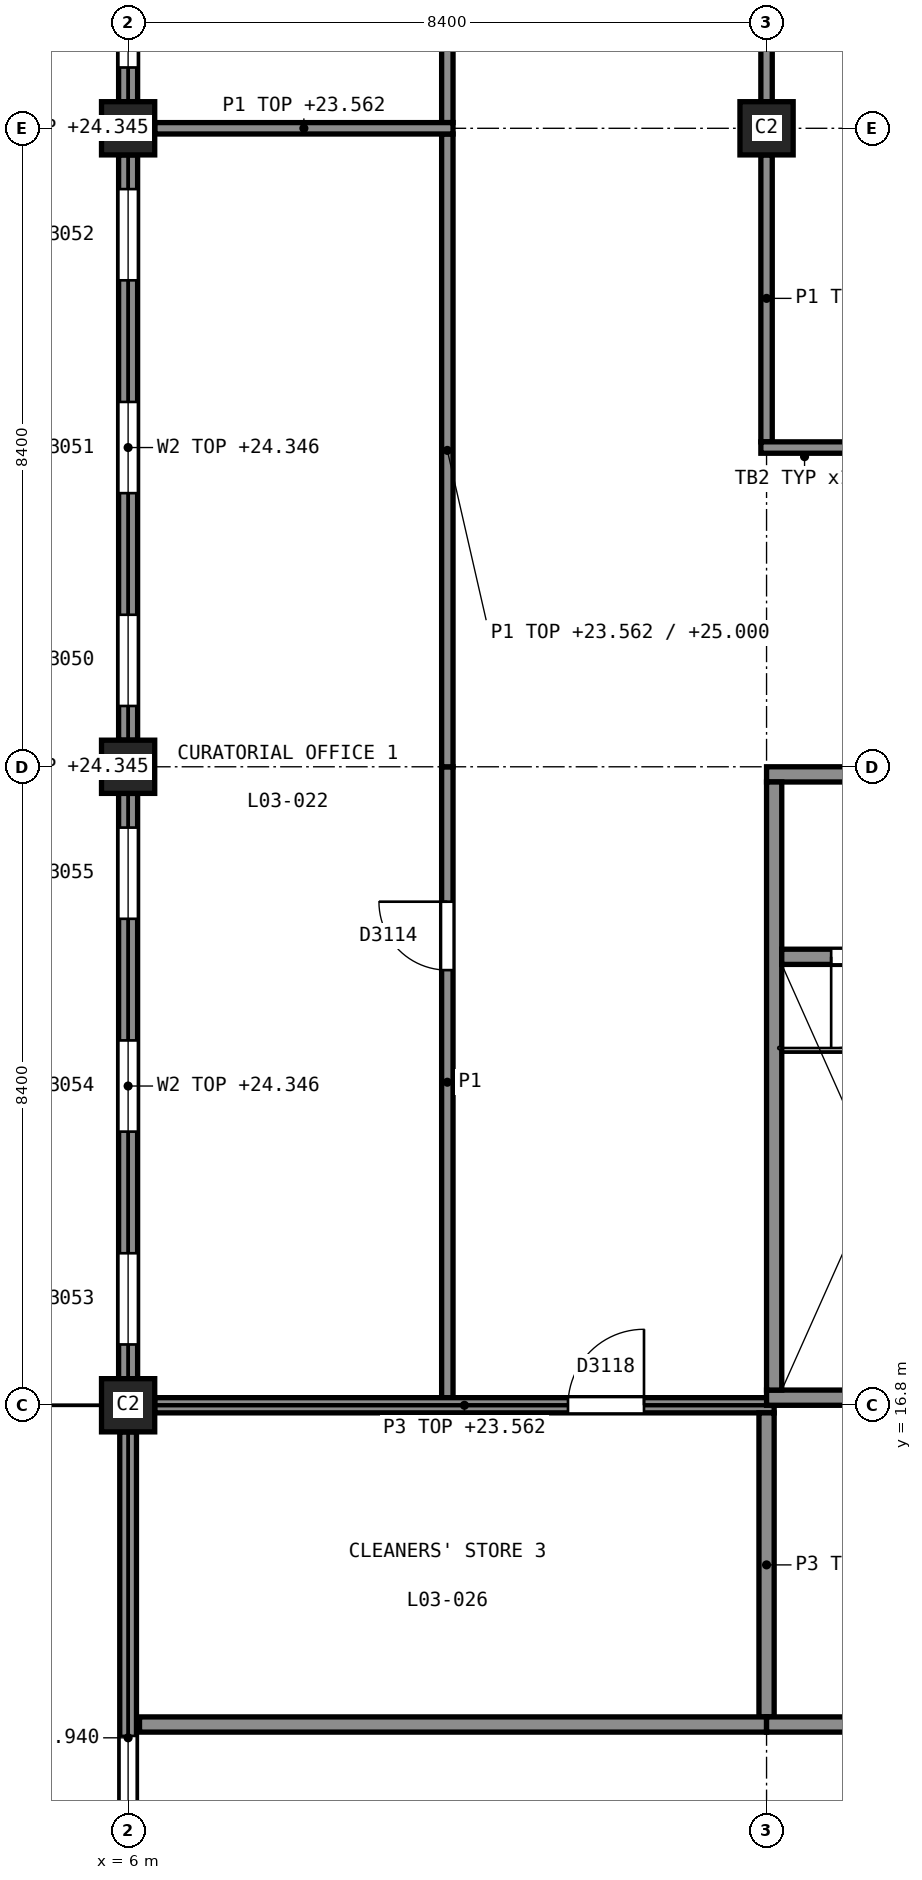
"""IFC4 building model, lengths in metres.
Left out: names, types, materials, properties, quantities, classifications, styles, units other than length and angle.
Written with IfcOpenShell. Run it as: python <this file> out.ifc"""

import sys

from ifc_helpers import new_model, si_unit, direction, frame, frame_2d, origin, origin_2d, place, context, subcontext, project, spatial, polyline, rectangle, outline, extrude, element, fill, save


model = new_model("IFC4")
c1 = context("Model", 3, precision=1e-05, world=origin(), true_north=direction((0.0, 1.0)))
c2 = subcontext(c1, "Body", "Model", "MODEL_VIEW")
j1 = project(units=[si_unit("LENGTHUNIT", "METRE"), si_unit("PLANEANGLEUNIT", "RADIAN")], contexts=[c1])
p1 = place(None, origin())
s1 = spatial("IfcSite", under=j1, at=p1, CompositionType="ELEMENT")
p2 = place(p1, origin())
s2 = spatial("IfcBuilding", under=s1, at=p2, CompositionType="ELEMENT")
p3 = place(p2, frame((0.0, 0.0, 20.0)))
s3 = spatial("IfcBuildingStorey", under=s2, at=p3, CompositionType="ELEMENT", Elevation=20.0)
p4 = place(p3, frame((14.4, 16.9, 0.0), z_axis=(0.0, 0.0, 1.0), x_axis=(1.0, 0.0, 0.0)))
e1 = element("IfcWall", 1, at=p4, inside=s3, PredefinedType="SHEAR", context=c2, shape_type="SweptSolid", body=[
    extrude(rectangle(XDim=8.4, YDim=0.2, at=frame_2d((4.2, 0.0))), origin(), (0.0, 0.0, 1.0), 8.8),
])
p5 = place(p3, frame((14.4, 25.1, 0.0), z_axis=(0.0, 0.0, 1.0), x_axis=(1.0, 0.0, 0.0)))
e2 = element("IfcWall", 2, at=p5, inside=s3, PredefinedType="SHEAR", context=c2, shape_type="SweptSolid", body=[
    extrude(outline(polyline([(0.0, 0.0), (8.4, 0.0), (8.4, 8.8), (7.531, 8.572), (7.241, 8.497), (5.503, 8.041), (5.214, 7.966), (3.186, 7.434), (2.896, 7.359), (1.159, 6.903), (0.869, 6.828), (0.0, 6.6), (0.0, 0.0)])), frame((0.0, 0.1, 0.0), z_axis=(0.0, -1.0, 0.0), x_axis=(1.0, 0.0, 0.0)), (0.0, 0.0, 1.0), 0.2),
])
p6 = place(p5, frame((3.3, 0.0, 0.0)))
e3 = element("IfcOpeningElement", 3, at=p6, cuts=e2, PredefinedType="OPENING", context=c2, shape_type="SweptSolid", body=[
    extrude(rectangle(XDim=1.8, YDim=2.1, at=frame_2d((0.9, 1.05))), frame((0.0, 0.11, 0.0), z_axis=(0.0, -1.0, 0.0), x_axis=(1.0, 0.0, 0.0)), (0.0, 0.0, 1.0), 0.22),
])
p7 = place(p3, frame((14.5, 17.0, 0.0), z_axis=(0.0, 0.0, 1.0), x_axis=(0.0, 1.0, 0.0)))
e4 = element("IfcWall", 4, at=p7, inside=s3, PredefinedType="SHEAR", context=c2, shape_type="SweptSolid", body=[
    extrude(rectangle(XDim=8.0, YDim=0.2, at=frame_2d((4.0, 0.0))), origin(), (0.0, 0.0, 1.0), 6.625),
])
p8 = place(p3, frame((14.6, 22.7, 0.0), z_axis=(0.0, 0.0, 1.0), x_axis=(1.0, 0.0, 0.0)))
e5 = element("IfcWall", 5, at=p8, inside=s3, PredefinedType="SHEAR", context=c2, shape_type="SweptSolid", body=[
    extrude(outline(polyline([(0.0, 0.0), (8.0, 0.0), (8.0, 8.748), (7.407, 8.592), (7.111, 8.515), (6.815, 8.437), (6.519, 8.36), (5.926, 8.204), (5.63, 8.127), (5.333, 8.049), (5.037, 7.972), (4.444, 7.816), (4.148, 7.739), (3.852, 7.661), (3.556, 7.584), (2.963, 7.428), (2.667, 7.351), (2.37, 7.273), (2.074, 7.196), (1.481, 7.04), (1.185, 6.963), (0.889, 6.885), (0.593, 6.808), (0.0, 6.652), (0.0, 0.0)])), frame((0.0, 0.1, 0.0), z_axis=(0.0, -1.0, 0.0), x_axis=(1.0, 0.0, 0.0)), (0.0, 0.0, 1.0), 0.2),
])
p9 = place(p8, frame((0.65, 0.0, 0.0)))
e6 = element("IfcOpeningElement", 6, at=p9, cuts=e5, PredefinedType="OPENING", context=c2, shape_type="SweptSolid", body=[
    extrude(rectangle(XDim=1.2, YDim=2.1, at=frame_2d((0.6, 1.05))), frame((0.0, 0.11, 0.0), z_axis=(0.0, -1.0, 0.0), x_axis=(1.0, 0.0, 0.0)), (0.0, 0.0, 1.0), 0.22),
])
p10 = place(p8, frame((6.15, 0.0, 0.0)))
e7 = element("IfcOpeningElement", 7, at=p10, cuts=e5, PredefinedType="OPENING", context=c2, shape_type="SweptSolid", body=[
    extrude(rectangle(XDim=1.2, YDim=2.1, at=frame_2d((0.6, 1.05))), frame((0.0, 0.11, 0.0), z_axis=(0.0, -1.0, 0.0), x_axis=(1.0, 0.0, 0.0)), (0.0, 0.0, 1.0), 0.22),
])
p11 = place(p8, frame((3.45, 0.0, 0.0)))
e8 = element("IfcOpeningElement", 8, at=p11, cuts=e5, PredefinedType="OPENING", context=c2, shape_type="SweptSolid", body=[
    extrude(rectangle(XDim=1.1, YDim=2.1, at=frame_2d((0.55, 1.05))), frame((0.0, 0.11, 0.0), z_axis=(0.0, -1.0, 0.0), x_axis=(1.0, 0.0, 0.0)), (0.0, 0.0, 1.0), 0.22),
])
p12 = place(p3, frame((6.0, 16.8, 0.0), z_axis=(0.0, 0.0, 1.0), x_axis=(1.0, 0.0, 0.0)))
e9 = element("IfcColumn", 9, at=p12, inside=s3, PredefinedType="COLUMN", context=c2, shape_type="SweptSolid", body=[
    extrude(rectangle(XDim=0.7, YDim=0.7, at=origin_2d()), origin(), (0.0, 0.0, 1.0), 5.0),
])
for number, where, z_axis, x_axis in (
    (10, (6.0, 25.2, 0.0), (0.0, 0.0, 1.0), (1.0, 0.0, 0.0)),
    (11, (6.0, 33.6, 0.0), (0.0, 0.0, 1.0), (1.0, 0.0, 0.0)),
):
    element("IfcColumn", number, at=place(p3, frame(where, z_axis=z_axis, x_axis=x_axis)), inside=s3, PredefinedType="COLUMN", context=c2, shape_type="SweptSolid", body=[
        extrude(rectangle(XDim=0.7, YDim=0.7, at=origin_2d()), origin(), (0.0, 0.0, 1.0), 4.345),
    ])
p13 = place(p3, frame((14.4, 33.6, 0.0), z_axis=(0.0, 0.0, 1.0), x_axis=(1.0, 0.0, 0.0)))
e12 = element("IfcColumn", 12, at=p13, inside=s3, PredefinedType="COLUMN", context=c2, shape_type="SweptSolid", body=[
    extrude(rectangle(XDim=0.7, YDim=0.7, at=origin_2d()), origin(), (0.0, 0.0, 1.0), 5.0),
])
p14 = place(p3, frame((6.0, 33.95, 0.0), z_axis=(0.0, 0.0, 1.0), x_axis=(0.0, 1.0, 0.0)))
e13 = element("IfcWall", 13, at=p14, inside=s3, PredefinedType="SOLIDWALL", context=c2, shape_type="SweptSolid", body=[
    extrude(rectangle(XDim=7.7, YDim=0.25, at=frame_2d((3.85, 0.0))), origin(), (0.0, 0.0, 1.0), 4.346),
])
p15 = place(p14, frame((0.45, 0.0, 0.9)))
e14 = element("IfcOpeningElement", 14, at=p15, cuts=e13, PredefinedType="OPENING", context=c2, shape_type="SweptSolid", body=[
    extrude(rectangle(XDim=1.2, YDim=2.1, at=frame_2d((0.6, 1.05))), frame((0.0, 0.135, 0.0), z_axis=(0.0, -1.0, 0.0), x_axis=(1.0, 0.0, 0.0)), (0.0, 0.0, 1.0), 0.27),
])
p16 = place(p14, frame((3.25, 0.0, 0.9)))
e15 = element("IfcOpeningElement", 15, at=p16, cuts=e13, PredefinedType="OPENING", context=c2, shape_type="SweptSolid", body=[
    extrude(rectangle(XDim=1.2, YDim=2.1, at=frame_2d((0.6, 1.05))), frame((0.0, 0.135, 0.0), z_axis=(0.0, -1.0, 0.0), x_axis=(1.0, 0.0, 0.0)), (0.0, 0.0, 1.0), 0.27),
])
p17 = place(p14, frame((6.05, 0.0, 0.9)))
e16 = element("IfcOpeningElement", 16, at=p17, cuts=e13, PredefinedType="OPENING", context=c2, shape_type="SweptSolid", body=[
    extrude(rectangle(XDim=1.2, YDim=2.1, at=frame_2d((0.6, 1.05))), frame((0.0, 0.135, 0.0), z_axis=(0.0, -1.0, 0.0), x_axis=(1.0, 0.0, 0.0)), (0.0, 0.0, 1.0), 0.27),
])
p18 = place(p3, frame((6.0, 25.55, 0.0), z_axis=(0.0, 0.0, 1.0), x_axis=(0.0, 1.0, 0.0)))
e17 = element("IfcWall", 17, at=p18, inside=s3, PredefinedType="SOLIDWALL", context=c2, shape_type="SweptSolid", body=[
    extrude(rectangle(XDim=7.7, YDim=0.25, at=frame_2d((3.85, 0.0))), origin(), (0.0, 0.0, 1.0), 4.346),
])
p19 = place(p18, frame((0.45, 0.0, 0.9)))
e18 = element("IfcOpeningElement", 18, at=p19, cuts=e17, PredefinedType="OPENING", context=c2, shape_type="SweptSolid", body=[
    extrude(rectangle(XDim=1.2, YDim=2.1, at=frame_2d((0.6, 1.05))), frame((0.0, 0.135, 0.0), z_axis=(0.0, -1.0, 0.0), x_axis=(1.0, 0.0, 0.0)), (0.0, 0.0, 1.0), 0.27),
])
p20 = place(p18, frame((3.25, 0.0, 0.9)))
e19 = element("IfcOpeningElement", 19, at=p20, cuts=e17, PredefinedType="OPENING", context=c2, shape_type="SweptSolid", body=[
    extrude(rectangle(XDim=1.2, YDim=2.1, at=frame_2d((0.6, 1.05))), frame((0.0, 0.135, 0.0), z_axis=(0.0, -1.0, 0.0), x_axis=(1.0, 0.0, 0.0)), (0.0, 0.0, 1.0), 0.27),
])
p21 = place(p18, frame((6.05, 0.0, 0.9)))
e20 = element("IfcOpeningElement", 20, at=p21, cuts=e17, PredefinedType="OPENING", context=c2, shape_type="SweptSolid", body=[
    extrude(rectangle(XDim=1.2, YDim=2.1, at=frame_2d((0.6, 1.05))), frame((0.0, 0.135, 0.0), z_axis=(0.0, -1.0, 0.0), x_axis=(1.0, 0.0, 0.0)), (0.0, 0.0, 1.0), 0.27),
])
p22 = place(p3, frame((6.0, 17.15, 0.0), z_axis=(0.0, 0.0, 1.0), x_axis=(0.0, 1.0, 0.0)))
e21 = element("IfcWall", 21, at=p22, inside=s3, PredefinedType="SOLIDWALL", context=c2, shape_type="SweptSolid", body=[
    extrude(rectangle(XDim=7.7, YDim=0.25, at=frame_2d((3.85, 0.0))), origin(), (0.0, 0.0, 1.0), 4.346),
])
p23 = place(p22, frame((0.45, 0.0, 0.9)))
e22 = element("IfcOpeningElement", 22, at=p23, cuts=e21, PredefinedType="OPENING", context=c2, shape_type="SweptSolid", body=[
    extrude(rectangle(XDim=1.2, YDim=2.1, at=frame_2d((0.6, 1.05))), frame((0.0, 0.135, 0.0), z_axis=(0.0, -1.0, 0.0), x_axis=(1.0, 0.0, 0.0)), (0.0, 0.0, 1.0), 0.27),
])
p24 = place(p22, frame((3.25, 0.0, 0.9)))
e23 = element("IfcOpeningElement", 23, at=p24, cuts=e21, PredefinedType="OPENING", context=c2, shape_type="SweptSolid", body=[
    extrude(rectangle(XDim=1.2, YDim=2.1, at=frame_2d((0.6, 1.05))), frame((0.0, 0.135, 0.0), z_axis=(0.0, -1.0, 0.0), x_axis=(1.0, 0.0, 0.0)), (0.0, 0.0, 1.0), 0.27),
])
p25 = place(p22, frame((6.05, 0.0, 0.9)))
e24 = element("IfcOpeningElement", 24, at=p25, cuts=e21, PredefinedType="OPENING", context=c2, shape_type="SweptSolid", body=[
    extrude(rectangle(XDim=1.2, YDim=2.1, at=frame_2d((0.6, 1.05))), frame((0.0, 0.135, 0.0), z_axis=(0.0, -1.0, 0.0), x_axis=(1.0, 0.0, 0.0)), (0.0, 0.0, 1.0), 0.27),
])
p26 = place(p3, frame((6.0, 8.4, 0.0), z_axis=(0.0, 0.0, 1.0), x_axis=(0.0, 1.0, 0.0)))
e25 = element("IfcWall", 25, at=p26, inside=s3, PredefinedType="SOLIDWALL", context=c2, shape_type="SweptSolid", body=[
    extrude(rectangle(XDim=8.05, YDim=0.22, at=frame_2d((4.025, 0.0))), origin(), (0.0, 0.0, 1.0), 3.94),
])
p27 = place(p26, frame((0.45, 0.0, 0.9)))
e26 = element("IfcOpeningElement", 26, at=p27, cuts=e25, PredefinedType="OPENING", context=c2, shape_type="SweptSolid", body=[
    extrude(rectangle(XDim=3.6, YDim=1.5, at=frame_2d((1.8, 0.75))), frame((0.0, 0.12, 0.0), z_axis=(0.0, -1.0, 0.0), x_axis=(1.0, 0.0, 0.0)), (0.0, 0.0, 1.0), 0.24),
])
p28 = place(p3, frame((10.2, 33.675, 0.0), z_axis=(0.0, 0.0, 1.0), x_axis=(0.0, 1.0, 0.0)))
e27 = element("IfcWall", 27, at=p28, inside=s3, PredefinedType="PARTITIONING", context=c2, shape_type="SweptSolid", body=[
    extrude(outline(polyline([(0.0, 0.0), (8.325, 0.0), (8.325, 3.562), (7.35, 5.0), (5.25, 5.0), (4.2, 3.562), (3.15, 5.0), (0.0, 5.0), (0.0, 0.0)])), frame((0.0, 0.075, 0.0), z_axis=(0.0, -1.0, 0.0), x_axis=(1.0, 0.0, 0.0)), (0.0, 0.0, 1.0), 0.15),
])
p29 = place(p28, frame((5.65, 0.0, 0.0)))
e28 = element("IfcOpeningElement", 28, at=p29, cuts=e27, PredefinedType="OPENING", context=c2, shape_type="SweptSolid", body=[
    extrude(rectangle(XDim=0.9, YDim=2.1, at=frame_2d((0.45, 1.05))), frame((0.0, 0.085, 0.0), z_axis=(0.0, -1.0, 0.0), x_axis=(1.0, 0.0, 0.0)), (0.0, 0.0, 1.0), 0.17),
])
p30 = place(p3, frame((14.4, 29.475, 0.0), z_axis=(0.0, 0.0, 1.0), x_axis=(0.0, 1.0, 0.0)))
e29 = element("IfcWall", 29, at=p30, inside=s3, PredefinedType="PARTITIONING", context=c2, shape_type="SweptSolid", body=[
    extrude(rectangle(XDim=3.775, YDim=0.15, at=frame_2d((1.887, 0.0))), origin(), (0.0, 0.0, 1.0), 6.1),
])
p31 = place(p3, frame((14.4, 33.95, 0.0), z_axis=(0.0, 0.0, 1.0), x_axis=(0.0, 1.0, 0.0)))
e30 = element("IfcWall", 30, at=p31, inside=s3, PredefinedType="PARTITIONING", context=c2, shape_type="SweptSolid", body=[
    extrude(outline(polyline([(0.0, 0.0), (7.7, 0.0), (7.7, 6.1), (6.3, 6.1), (5.25, 3.562), (4.2, 6.1), (2.1, 6.1), (1.05, 3.562), (0.0, 6.1), (0.0, 0.0)])), frame((0.0, 0.075, 0.0), z_axis=(0.0, -1.0, 0.0), x_axis=(1.0, 0.0, 0.0)), (0.0, 0.0, 1.0), 0.15),
])
p32 = place(p3, frame((14.325, 29.4, 0.0), z_axis=(0.0, 0.0, 1.0), x_axis=(1.0, 0.0, 0.0)))
e31 = element("IfcWall", 31, at=p32, inside=s3, PredefinedType="PARTITIONING", context=c2, shape_type="SweptSolid", body=[
    extrude(outline(polyline([(0.0, 0.0), (8.325, 0.0), (8.325, 8.221), (7.35, 8.005), (1.05, 6.355), (0.0, 3.562), (0.0, 0.0)])), frame((0.0, 0.075, 0.0), z_axis=(0.0, -1.0, 0.0), x_axis=(1.0, 0.0, 0.0)), (0.0, 0.0, 1.0), 0.15),
])
p33 = place(p32, frame((1.438, 0.0, 0.0)))
e32 = element("IfcOpeningElement", 32, at=p33, cuts=e31, PredefinedType="OPENING", context=c2, shape_type="SweptSolid", body=[
    extrude(rectangle(XDim=1.8, YDim=2.1, at=frame_2d((0.9, 1.05))), frame((0.0, 0.085, 0.0), z_axis=(0.0, -1.0, 0.0), x_axis=(1.0, 0.0, 0.0)), (0.0, 0.0, 1.0), 0.17),
])
p34 = place(p3, frame((10.2, 16.9, 0.0), z_axis=(0.0, 0.0, 1.0), x_axis=(0.0, 1.0, 0.0)))
e33 = element("IfcWall", 33, at=p34, inside=s3, PredefinedType="PARTITIONING", context=c2, shape_type="SweptSolid", body=[
    extrude(outline(polyline([(0.0, 0.0), (8.3, 0.0), (8.3, 5.0), (5.25, 5.0), (4.2, 3.562), (3.15, 5.0), (0.0, 5.0), (0.0, 0.0)])), frame((0.0, 0.075, 0.0), z_axis=(0.0, -1.0, 0.0), x_axis=(1.0, 0.0, 0.0)), (0.0, 0.0, 1.0), 0.15),
])
p35 = place(p34, frame((5.625, 0.0, 0.0)))
e34 = element("IfcOpeningElement", 34, at=p35, cuts=e33, PredefinedType="OPENING", context=c2, shape_type="SweptSolid", body=[
    extrude(rectangle(XDim=0.9, YDim=2.1, at=frame_2d((0.45, 1.05))), frame((0.0, 0.085, 0.0), z_axis=(0.0, -1.0, 0.0), x_axis=(1.0, 0.0, 0.0)), (0.0, 0.0, 1.0), 0.17),
])
p36 = place(p3, frame((10.2, 25.2, 0.0), z_axis=(0.0, 0.0, 1.0), x_axis=(0.0, 1.0, 0.0)))
e35 = element("IfcWall", 35, at=p36, inside=s3, PredefinedType="PARTITIONING", context=c2, shape_type="SweptSolid", body=[
    extrude(outline(polyline([(0.0, 0.0), (8.325, 0.0), (8.325, 5.0), (5.25, 5.0), (4.2, 3.562), (3.15, 5.0), (1.05, 5.0), (0.0, 3.562), (0.0, 0.0)])), frame((0.0, 0.075, 0.0), z_axis=(0.0, -1.0, 0.0), x_axis=(1.0, 0.0, 0.0)), (0.0, 0.0, 1.0), 0.15),
])
p37 = place(p3, frame((6.35, 33.6, 0.0), z_axis=(0.0, 0.0, 1.0), x_axis=(1.0, 0.0, 0.0)))
e36 = element("IfcWall", 36, at=p37, inside=s3, PredefinedType="PARTITIONING", context=c2, shape_type="SweptSolid", body=[
    extrude(rectangle(XDim=3.925, YDim=0.15, at=frame_2d((1.962, 0.0))), origin(), (0.0, 0.0, 1.0), 3.562),
])
p38 = place(p3, frame((6.35, 16.8, 0.0), z_axis=(0.0, 0.0, 1.0), x_axis=(1.0, 0.0, 0.0)))
e37 = element("IfcWall", 37, at=p38, inside=s3, PredefinedType="PARTITIONING", context=c2, shape_type="SweptSolid", body=[
    extrude(rectangle(XDim=8.15, YDim=0.2, at=frame_2d((4.075, 0.0))), origin(), (0.0, 0.0, 1.0), 3.562),
])
p39 = place(p38, frame((5.438, 0.0, 0.0)))
e38 = element("IfcOpeningElement", 38, at=p39, cuts=e37, PredefinedType="OPENING", context=c2, shape_type="SweptSolid", body=[
    extrude(rectangle(XDim=1.0, YDim=2.1, at=frame_2d((0.5, 1.05))), frame((0.0, 0.11, 0.0), z_axis=(0.0, -1.0, 0.0), x_axis=(1.0, 0.0, 0.0)), (0.0, 0.0, 1.0), 0.22),
])
p40 = place(p3, frame((14.4, 12.7, 0.0), z_axis=(0.0, 0.0, 1.0), x_axis=(0.0, 1.0, 0.0)))
e39 = element("IfcWall", 39, at=p40, inside=s3, PredefinedType="PARTITIONING", context=c2, shape_type="SweptSolid", body=[
    extrude(rectangle(XDim=4.0, YDim=0.2, at=frame_2d((2.0, 0.0))), origin(), (0.0, 0.0, 1.0), 3.9),
])
p41 = place(p3, frame((6.15, 12.6, 0.0), z_axis=(0.0, 0.0, 1.0), x_axis=(1.0, 0.0, 0.0)))
e40 = element("IfcWall", 40, at=p41, inside=s3, PredefinedType="PARTITIONING", context=c2, shape_type="SweptSolid", body=[
    extrude(rectangle(XDim=8.25, YDim=0.2, at=frame_2d((4.125, 0.0))), origin(), (0.0, 0.0, 1.0), 3.9),
])
p42 = place(p3, frame((14.4, 12.6, 0.0), z_axis=(0.0, 0.0, 1.0), x_axis=(1.0, 0.0, 0.0)))
e41 = element("IfcWall", 41, at=p42, inside=s3, PredefinedType="PARTITIONING", context=c2, shape_type="SweptSolid", body=[
    extrude(rectangle(XDim=8.5, YDim=0.2, at=frame_2d((4.25, 0.0))), origin(), (0.0, 0.0, 1.0), 3.9),
])
p43 = place(p42, frame((1.775, 0.0, 0.0)))
e42 = element("IfcOpeningElement", 42, at=p43, cuts=e41, PredefinedType="OPENING", context=c2, shape_type="SweptSolid", body=[
    extrude(rectangle(XDim=1.0, YDim=2.1, at=frame_2d((0.5, 1.05))), frame((0.0, 0.11, 0.0), z_axis=(0.0, -1.0, 0.0), x_axis=(1.0, 0.0, 0.0)), (0.0, 0.0, 1.0), 0.22),
])
p44 = place(p15, origin())
e43 = element("IfcWindow", 43, at=p44, inside=s3, PartitioningType="SINGLE_PANEL", PredefinedType="WINDOW", context=c2, shape_type="SweptSolid", body=[
    extrude(rectangle(XDim=1.2, YDim=2.1, at=frame_2d((0.6, 1.05))), frame((0.0, -0.045, 0.0), z_axis=(0.0, -1.0, 0.0), x_axis=(1.0, 0.0, 0.0)), (0.0, 0.0, 1.0), 0.06),
])
fill(e14, e43)
p45 = place(p19, origin())
e44 = element("IfcWindow", 44, at=p45, inside=s3, PartitioningType="SINGLE_PANEL", PredefinedType="WINDOW", context=c2, shape_type="SweptSolid", body=[
    extrude(rectangle(XDim=1.2, YDim=2.1, at=frame_2d((0.6, 1.05))), frame((0.0, -0.045, 0.0), z_axis=(0.0, -1.0, 0.0), x_axis=(1.0, 0.0, 0.0)), (0.0, 0.0, 1.0), 0.06),
])
fill(e18, e44)
p46 = place(p20, origin())
e45 = element("IfcWindow", 45, at=p46, inside=s3, PartitioningType="SINGLE_PANEL", PredefinedType="WINDOW", context=c2, shape_type="SweptSolid", body=[
    extrude(rectangle(XDim=1.2, YDim=2.1, at=frame_2d((0.6, 1.05))), frame((0.0, -0.045, 0.0), z_axis=(0.0, -1.0, 0.0), x_axis=(1.0, 0.0, 0.0)), (0.0, 0.0, 1.0), 0.06),
])
fill(e19, e45)
p47 = place(p21, origin())
e46 = element("IfcWindow", 46, at=p47, inside=s3, PartitioningType="SINGLE_PANEL", PredefinedType="WINDOW", context=c2, shape_type="SweptSolid", body=[
    extrude(rectangle(XDim=1.2, YDim=2.1, at=frame_2d((0.6, 1.05))), frame((0.0, -0.045, 0.0), z_axis=(0.0, -1.0, 0.0), x_axis=(1.0, 0.0, 0.0)), (0.0, 0.0, 1.0), 0.06),
])
fill(e20, e46)
p48 = place(p23, origin())
e47 = element("IfcWindow", 47, at=p48, inside=s3, PartitioningType="SINGLE_PANEL", PredefinedType="WINDOW", context=c2, shape_type="SweptSolid", body=[
    extrude(rectangle(XDim=1.2, YDim=2.1, at=frame_2d((0.6, 1.05))), frame((0.0, -0.045, 0.0), z_axis=(0.0, -1.0, 0.0), x_axis=(1.0, 0.0, 0.0)), (0.0, 0.0, 1.0), 0.06),
])
fill(e22, e47)
p49 = place(p24, origin())
e48 = element("IfcWindow", 48, at=p49, inside=s3, PartitioningType="SINGLE_PANEL", PredefinedType="WINDOW", context=c2, shape_type="SweptSolid", body=[
    extrude(rectangle(XDim=1.2, YDim=2.1, at=frame_2d((0.6, 1.05))), frame((0.0, -0.045, 0.0), z_axis=(0.0, -1.0, 0.0), x_axis=(1.0, 0.0, 0.0)), (0.0, 0.0, 1.0), 0.06),
])
fill(e23, e48)
p50 = place(p25, origin())
e49 = element("IfcWindow", 49, at=p50, inside=s3, PartitioningType="SINGLE_PANEL", PredefinedType="WINDOW", context=c2, shape_type="SweptSolid", body=[
    extrude(rectangle(XDim=1.2, YDim=2.1, at=frame_2d((0.6, 1.05))), frame((0.0, -0.045, 0.0), z_axis=(0.0, -1.0, 0.0), x_axis=(1.0, 0.0, 0.0)), (0.0, 0.0, 1.0), 0.06),
])
fill(e24, e49)
p51 = place(p27, origin())
e50 = element("IfcWindow", 50, at=p51, inside=s3, PartitioningType="DOUBLE_PANEL_VERTICAL", PredefinedType="WINDOW", context=c2, shape_type="SweptSolid", body=[
    extrude(rectangle(XDim=3.6, YDim=1.5, at=frame_2d((1.8, 0.75))), frame((0.0, -0.03, 0.0), z_axis=(0.0, -1.0, 0.0), x_axis=(1.0, 0.0, 0.0)), (0.0, 0.0, 1.0), 0.06),
])
fill(e26, e50)
p52 = place(p35, origin())
e51 = element("IfcDoor", 51, at=p52, inside=s3, OperationType="SINGLE_SWING_LEFT", PredefinedType="DOOR", context=c2, shape_type="SweptSolid", body=[
    extrude(rectangle(XDim=0.9, YDim=2.1, at=frame_2d((0.45, 1.05))), frame((0.0, 0.025, 0.0), z_axis=(0.0, -1.0, 0.0), x_axis=(1.0, 0.0, 0.0)), (0.0, 0.0, 1.0), 0.05),
])
fill(e34, e51)
p53 = place(p39, origin())
e52 = element("IfcDoor", 52, at=p53, inside=s3, OperationType="SINGLE_SWING_LEFT", PredefinedType="DOOR", context=c2, shape_type="SweptSolid", body=[
    extrude(rectangle(XDim=1.0, YDim=2.1, at=frame_2d((0.5, 1.05))), frame((0.0, 0.025, 0.0), z_axis=(0.0, -1.0, 0.0), x_axis=(1.0, 0.0, 0.0)), (0.0, 0.0, 1.0), 0.05),
])
fill(e38, e52)
p54 = place(p9, origin())
e53 = element("IfcDoor", 53, at=p54, inside=s3, OperationType="SINGLE_SWING_LEFT", PredefinedType="DOOR", context=c2, shape_type="SweptSolid", body=[
    extrude(rectangle(XDim=1.2, YDim=2.1, at=frame_2d((0.6, 1.05))), frame((0.0, 0.025, 0.0), z_axis=(0.0, -1.0, 0.0), x_axis=(1.0, 0.0, 0.0)), (0.0, 0.0, 1.0), 0.05),
])
fill(e6, e53)
save(model, sys.argv[1])
